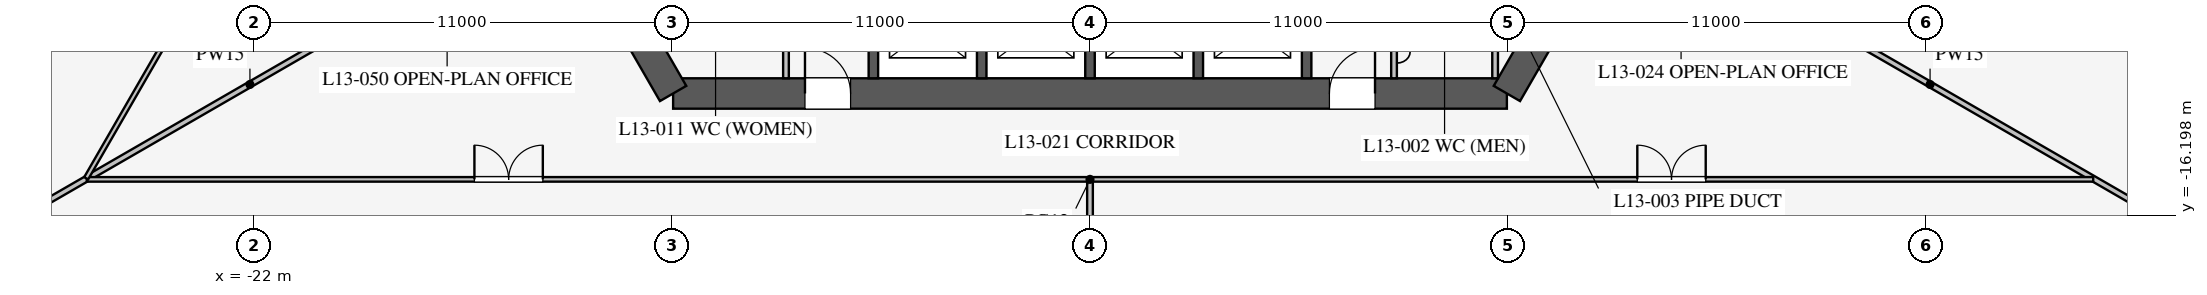
"""IFC4 building model, lengths in metres.
Left out: names, types, materials, properties, quantities, classifications, styles, units other than length and angle.
Written with IfcOpenShell. Run it as: python <this file> out.ifc"""

import sys

from ifc_helpers import new_model, si_unit, direction, frame, frame_2d, origin, place, context, subcontext, project, spatial, rectangle, extrude, element, fill, save


model = new_model("IFC4")
c1 = context("Model", 3, precision=1e-05, world=origin(), true_north=direction((0.0, 1.0)))
c2 = subcontext(c1, "Body", "Model", "MODEL_VIEW")
j1 = project(units=[si_unit("LENGTHUNIT", "METRE"), si_unit("PLANEANGLEUNIT", "RADIAN")], contexts=[c1])
p1 = place(None, origin())
s1 = spatial("IfcSite", under=j1, at=p1, CompositionType="ELEMENT")
p2 = place(p1, origin())
s2 = spatial("IfcBuilding", under=s1, at=p2, CompositionType="ELEMENT")
p3 = place(p2, frame((0.0, 0.0, 58.5)))
s3 = spatial("IfcBuildingStorey", under=s2, at=p3, CompositionType="ELEMENT", Elevation=58.5)
p4 = place(p3, frame((-10.97, -13.0, 0.0), z_axis=(0.0, 0.0, 1.0), x_axis=(1.0, 0.0, 0.0)))
e1 = element("IfcWall", 1, at=p4, inside=s3, PredefinedType="SHEAR", context=c2, shape_type="SweptSolid", body=[
    extrude(rectangle(XDim=21.939, YDim=0.8, at=frame_2d((10.97, 0.0))), origin(), (0.0, 0.0, 1.0), 4.2),
])
p5 = place(p4, frame((17.27, 0.0, 0.0)))
e2 = element("IfcOpeningElement", 2, at=p5, cuts=e1, PredefinedType="OPENING", context=c2, shape_type="SweptSolid", body=[
    extrude(rectangle(XDim=1.2, YDim=2.1, at=frame_2d((0.6, 1.05))), frame((0.0, 0.41, 0.0), z_axis=(0.0, -1.0, 0.0), x_axis=(1.0, 0.0, 0.0)), (0.0, 0.0, 1.0), 0.82),
])
p6 = place(p4, frame((3.47, 0.0, 0.0)))
e3 = element("IfcOpeningElement", 3, at=p6, cuts=e1, PredefinedType="OPENING", context=c2, shape_type="SweptSolid", body=[
    extrude(rectangle(XDim=1.2, YDim=2.1, at=frame_2d((0.6, 1.05))), frame((0.0, 0.41, 0.0), z_axis=(0.0, -1.0, 0.0), x_axis=(1.0, 0.0, 0.0)), (0.0, 0.0, 1.0), 0.82),
])
for number, where, z_axis, x_axis in (
    (4, (10.97, -13.0, 0.0), (0.0, 0.0, 1.0), (0.5, 0.866, 0.0)),
    (5, (-16.743, -3.0, 0.0), (0.0, 0.0, 1.0), (0.5, -0.866, 0.0)),
):
    element("IfcWall", number, at=place(p3, frame(where, z_axis=z_axis, x_axis=x_axis)), inside=s3, PredefinedType="SHEAR", context=c2, shape_type="SweptSolid", body=[
        extrude(rectangle(XDim=11.547, YDim=0.8, at=frame_2d((5.773, 0.0))), origin(), (0.0, 0.0, 1.0), 4.2),
    ])
for number, where, z_axis, x_axis in (
    (6, (-5.7, -10.025, 0.0), (0.0, 0.0, 1.0), (0.0, -1.0, 0.0)),
    (7, (-2.85, -10.025, 0.0), (0.0, 0.0, 1.0), (0.0, -1.0, 0.0)),
    (8, (0.0, -10.025, 0.0), (0.0, 0.0, 1.0), (0.0, -1.0, 0.0)),
    (9, (2.85, -10.025, 0.0), (0.0, 0.0, 1.0), (0.0, -1.0, 0.0)),
    (10, (5.7, -10.025, 0.0), (0.0, 0.0, 1.0), (0.0, -1.0, 0.0)),
):
    element("IfcWall", number, at=place(p3, frame(where, z_axis=z_axis, x_axis=x_axis)), inside=s3, PredefinedType="SHEAR", context=c2, shape_type="SweptSolid", body=[
        extrude(rectangle(XDim=2.575, YDim=0.25, at=frame_2d((1.288, 0.0))), origin(), (0.0, 0.0, 1.0), 4.2),
    ])
p7 = place(p3, frame((8.0, -7.5, 0.0), z_axis=(0.0, 0.0, 1.0), x_axis=(0.0, -1.0, 0.0)))
e11 = element("IfcWall", 11, at=p7, inside=s3, PredefinedType="PARTITIONING", context=c2, shape_type="SweptSolid", body=[
    extrude(rectangle(XDim=5.1, YDim=0.15, at=frame_2d((2.55, 0.0))), origin(), (0.0, 0.0, 1.0), 4.0),
])
p8 = place(p7, frame((1.3, 0.0, 0.0)))
e12 = element("IfcOpeningElement", 12, at=p8, cuts=e11, PredefinedType="OPENING", context=c2, shape_type="SweptSolid", body=[
    extrude(rectangle(XDim=0.9, YDim=2.1, at=frame_2d((0.45, 1.05))), frame((0.0, 0.085, 0.0), z_axis=(0.0, -1.0, 0.0), x_axis=(1.0, 0.0, 0.0)), (0.0, 0.0, 1.0), 0.17),
])
p9 = place(p3, frame((-8.0, -7.5, 0.0), z_axis=(0.0, 0.0, 1.0), x_axis=(0.0, -1.0, 0.0)))
e13 = element("IfcWall", 13, at=p9, inside=s3, PredefinedType="PARTITIONING", context=c2, shape_type="SweptSolid", body=[
    extrude(rectangle(XDim=5.1, YDim=0.15, at=frame_2d((2.55, 0.0))), origin(), (0.0, 0.0, 1.0), 4.0),
])
p10 = place(p9, frame((2.6, 0.0, 0.0)))
e14 = element("IfcOpeningElement", 14, at=p10, cuts=e13, PredefinedType="OPENING", context=c2, shape_type="SweptSolid", body=[
    extrude(rectangle(XDim=0.9, YDim=2.1, at=frame_2d((0.45, 1.05))), frame((0.0, 0.085, 0.0), z_axis=(0.0, -1.0, 0.0), x_axis=(1.0, 0.0, 0.0)), (0.0, 0.0, 1.0), 0.17),
])
p11 = place(p3, frame((10.66, -8.5, 0.0), z_axis=(0.0, 0.0, 1.0), x_axis=(0.0, -1.0, 0.0)))
e15 = element("IfcWall", 15, at=p11, inside=s3, PredefinedType="PARTITIONING", context=c2, shape_type="SweptSolid", body=[
    extrude(rectangle(XDim=4.1, YDim=0.15, at=frame_2d((2.05, 0.0))), origin(), (0.0, 0.0, 1.0), 4.0),
])
for number, where, z_axis, x_axis in (
    (16, (14.203, -8.2, 0.0), (0.0, 0.0, 1.0), (0.866, -0.5, 0.0)),
    (17, (-14.203, -8.2, 0.0), (0.0, 0.0, 1.0), (-0.866, -0.5, 0.0)),
):
    element("IfcWall", number, at=place(p3, frame(where, z_axis=z_axis, x_axis=x_axis)), inside=s3, PredefinedType="PARTITIONING", context=c2, shape_type="SweptSolid", body=[
        extrude(rectangle(XDim=18.25, YDim=0.15, at=frame_2d((9.125, 0.0))), origin(), (0.0, 0.0, 1.0), 2.3),
    ])
p12 = place(p3, frame((0.0, -15.32, 0.0), z_axis=(0.0, 0.0, 1.0), x_axis=(0.0, -1.0, 0.0)))
e18 = element("IfcWall", 18, at=p12, inside=s3, PredefinedType="PARTITIONING", context=c2, shape_type="SweptSolid", body=[
    extrude(rectangle(XDim=10.849, YDim=0.15, at=frame_2d((5.424, 0.0))), origin(), (0.0, 0.0, 1.0), 2.8),
])
p13 = place(p3, frame((-26.398, -15.26, 0.0), z_axis=(0.0, 0.0, 1.0), x_axis=(1.0, 0.0, 0.0)))
e19 = element("IfcWall", 19, at=p13, inside=s3, PredefinedType="PARTITIONING", context=c2, shape_type="SweptSolid", body=[
    extrude(rectangle(XDim=52.796, YDim=0.12, at=frame_2d((26.398, 0.0))), origin(), (0.0, 0.0, 1.0), 2.9),
])
p14 = place(p13, frame((10.2, 0.0, 0.15)))
e20 = element("IfcOpeningElement", 20, at=p14, cuts=e19, PredefinedType="OPENING", context=c2, shape_type="SweptSolid", body=[
    extrude(rectangle(XDim=1.8, YDim=2.1, at=frame_2d((0.9, 1.05))), frame((0.0, 0.07, 0.0), z_axis=(0.0, -1.0, 0.0), x_axis=(1.0, 0.0, 0.0)), (0.0, 0.0, 1.0), 0.14),
])
p15 = place(p13, frame((40.8, 0.0, 0.15)))
e21 = element("IfcOpeningElement", 21, at=p15, cuts=e19, PredefinedType="OPENING", context=c2, shape_type="SweptSolid", body=[
    extrude(rectangle(XDim=1.8, YDim=2.1, at=frame_2d((0.9, 1.05))), frame((0.0, 0.07, 0.0), z_axis=(0.0, -1.0, 0.0), x_axis=(1.0, 0.0, 0.0)), (0.0, 0.0, 1.0), 0.14),
])
p16 = place(p3, frame((-0.016, 30.491, 0.0), z_axis=(0.0, 0.0, 1.0), x_axis=(-0.50000091641, -0.866024874695, 0.0)))
e22 = element("IfcWall", 22, at=p16, inside=s3, PredefinedType="PARTITIONING", context=c2, shape_type="SweptSolid", body=[
    extrude(rectangle(XDim=52.796, YDim=0.12, at=frame_2d((26.398, 0.0))), origin(), (0.0, 0.0, 1.0), 2.9),
])
p17 = place(p16, frame((10.2, 0.0, 0.15)))
e23 = element("IfcOpeningElement", 23, at=p17, cuts=e22, PredefinedType="OPENING", context=c2, shape_type="SweptSolid", body=[
    extrude(rectangle(XDim=1.8, YDim=2.1, at=frame_2d((0.9, 1.05))), frame((0.0, 0.07, 0.0), z_axis=(0.0, -1.0, 0.0), x_axis=(1.0, 0.0, 0.0)), (0.0, 0.0, 1.0), 0.14),
])
p18 = place(p16, frame((40.8, 0.0, 0.15)))
e24 = element("IfcOpeningElement", 24, at=p18, cuts=e22, PredefinedType="OPENING", context=c2, shape_type="SweptSolid", body=[
    extrude(rectangle(XDim=1.8, YDim=2.1, at=frame_2d((0.9, 1.05))), frame((0.0, 0.07, 0.0), z_axis=(0.0, -1.0, 0.0), x_axis=(1.0, 0.0, 0.0)), (0.0, 0.0, 1.0), 0.14),
])
p19 = place(p5, origin())
e25 = element("IfcDoor", 25, at=p19, inside=s3, OperationType="SINGLE_SWING_RIGHT", PredefinedType="DOOR", context=c2, shape_type="SweptSolid", body=[
    extrude(rectangle(XDim=1.2, YDim=2.1, at=frame_2d((0.6, 1.05))), frame((0.0, 0.025, 0.0), z_axis=(0.0, -1.0, 0.0), x_axis=(1.0, 0.0, 0.0)), (0.0, 0.0, 1.0), 0.05),
])
fill(e2, e25)
p20 = place(p6, origin())
e26 = element("IfcDoor", 26, at=p20, inside=s3, OperationType="SINGLE_SWING_LEFT", PredefinedType="DOOR", context=c2, shape_type="SweptSolid", body=[
    extrude(rectangle(XDim=1.2, YDim=2.1, at=frame_2d((0.6, 1.05))), frame((0.0, 0.025, 0.0), z_axis=(0.0, -1.0, 0.0), x_axis=(1.0, 0.0, 0.0)), (0.0, 0.0, 1.0), 0.05),
])
fill(e3, e26)
p21 = place(p14, origin())
e27 = element("IfcDoor", 27, at=p21, inside=s3, OperationType="DOUBLE_DOOR_SINGLE_SWING", PredefinedType="DOOR", context=c2, shape_type="SweptSolid", body=[
    extrude(rectangle(XDim=1.8, YDim=2.1, at=frame_2d((0.9, 1.05))), frame((0.0, 0.025, 0.0), z_axis=(0.0, -1.0, 0.0), x_axis=(1.0, 0.0, 0.0)), (0.0, 0.0, 1.0), 0.05),
])
fill(e20, e27)
p22 = place(p15, origin())
e28 = element("IfcDoor", 28, at=p22, inside=s3, OperationType="DOUBLE_DOOR_SINGLE_SWING", PredefinedType="DOOR", context=c2, shape_type="SweptSolid", body=[
    extrude(rectangle(XDim=1.8, YDim=2.1, at=frame_2d((0.9, 1.05))), frame((0.0, 0.025, 0.0), z_axis=(0.0, -1.0, 0.0), x_axis=(1.0, 0.0, 0.0)), (0.0, 0.0, 1.0), 0.05),
])
fill(e21, e28)
save(model, sys.argv[1])
